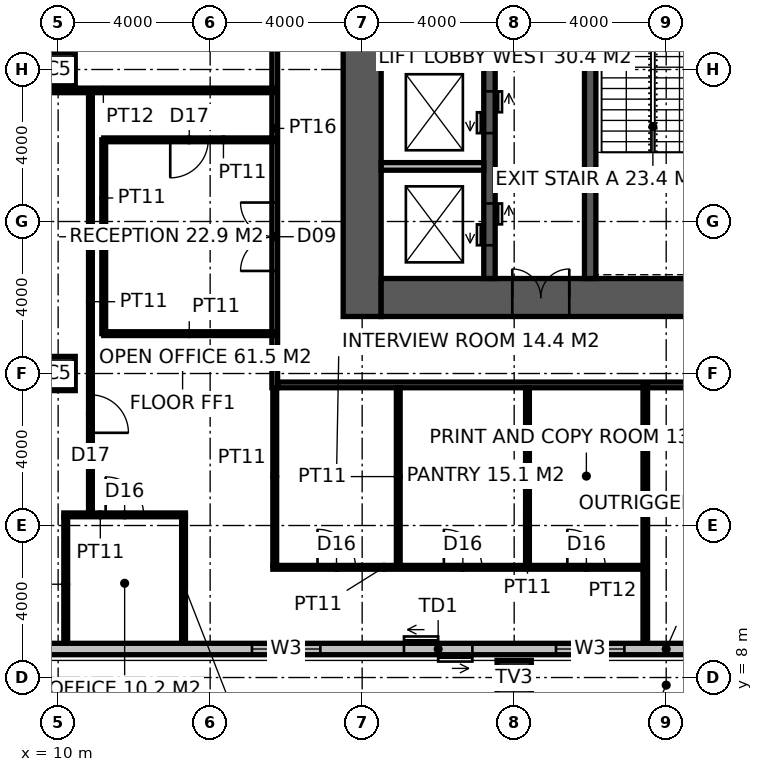
"""IFC4 building model, lengths in metres.
Left out: names, types, materials, properties, quantities, classifications, styles, units other than length and angle.
Written with IfcOpenShell. Run it as: python <this file> out.ifc"""

import sys

from ifc_helpers import new_model, si_unit, direction, frame, frame_2d, origin, origin_2d, place, context, subcontext, project, spatial, rectangle, hollow_rectangle, extrude, element, fill, save


model = new_model("IFC4")
c1 = context("Model", 3, precision=1e-05, world=origin(), true_north=direction((0.0, 1.0)))
c2 = subcontext(c1, "Body", "Model", "MODEL_VIEW")
j1 = project(units=[si_unit("LENGTHUNIT", "METRE"), si_unit("PLANEANGLEUNIT", "RADIAN")], contexts=[c1])
p1 = place(None, origin())
s1 = spatial("IfcSite", under=j1, at=p1, CompositionType="ELEMENT")
p2 = place(p1, origin())
s2 = spatial("IfcBuilding", under=s1, at=p2, CompositionType="ELEMENT")
p3 = place(p2, frame((0.0, 0.0, 171.8)))
s3 = spatial("IfcBuildingStorey", under=s2, at=p3, CompositionType="ELEMENT", Elevation=171.8)
p4 = place(p3, frame((22.0, 8.0, 0.0), z_axis=(0.0, 0.0, 1.0), x_axis=(1.0, 0.0, 0.0)))
e1 = element("IfcColumn", 1, at=p4, inside=s3, PredefinedType="USERDEFINED", context=c2, shape_type="SweptSolid", body=[
    extrude(hollow_rectangle(XDim=0.9, YDim=0.9, WallThickness=0.08, at=origin_2d()), origin(), (0.0, 0.0, 1.0), 4.0),
])
for number, where, z_axis, x_axis in (
    (2, (10.0, 16.0, 0.0), (0.0, 0.0, 1.0), (1.0, 0.0, 0.0)),
    (3, (10.0, 24.0, 0.0), (0.0, 0.0, 1.0), (1.0, 0.0, 0.0)),
):
    element("IfcColumn", number, at=place(p3, frame(where, z_axis=z_axis, x_axis=x_axis)), inside=s3, PredefinedType="COLUMN", context=c2, shape_type="SweptSolid", body=[
        extrude(hollow_rectangle(XDim=0.9, YDim=0.9, WallThickness=0.1, at=origin_2d()), origin(), (0.0, 0.0, 1.0), 4.0),
    ])
p5 = place(p3, frame((18.0, 17.5, -0.15), z_axis=(0.0, 0.0, 1.0), x_axis=(0.0, 1.0, 0.0)))
e4 = element("IfcWall", 4, at=p5, inside=s3, PredefinedType="SHEAR", context=c2, shape_type="SweptSolid", body=[
    extrude(rectangle(XDim=19.0, YDim=1.0, at=frame_2d((9.5, 0.0))), origin(), (0.0, 0.0, 1.0), 4.0),
])
p6 = place(p3, frame((18.5, 18.0, -0.15), z_axis=(0.0, 0.0, 1.0), x_axis=(1.0, 0.0, 0.0)))
e5 = element("IfcWall", 5, at=p6, inside=s3, PredefinedType="SHEAR", context=c2, shape_type="SweptSolid", body=[
    extrude(rectangle(XDim=17.6, YDim=1.0, at=frame_2d((8.8, 0.0))), origin(), (0.0, 0.0, 1.0), 4.0),
])
p7 = place(p6, frame((3.45, 0.0, 0.15)))
e6 = element("IfcOpeningElement", 6, at=p7, cuts=e5, PredefinedType="OPENING", context=c2, shape_type="SweptSolid", body=[
    extrude(rectangle(XDim=1.5, YDim=2.4, at=frame_2d((0.75, 1.2))), frame((0.0, 0.51, 0.0), z_axis=(0.0, -1.0, 0.0), x_axis=(1.0, 0.0, 0.0)), (0.0, 0.0, 1.0), 1.02),
])
p8 = place(p3, frame((24.0, 18.5, -0.15), z_axis=(0.0, 0.0, 1.0), x_axis=(0.0, 1.0, 0.0)))
e7 = element("IfcWall", 7, at=p8, inside=s3, PredefinedType="SHEAR", context=c2, shape_type="SweptSolid", body=[
    extrude(rectangle(XDim=17.0, YDim=0.3, at=frame_2d((8.5, 0.0))), origin(), (0.0, 0.0, 1.0), 4.0),
])
p9 = place(p8, frame((9.6, 0.0, 0.15)))
e8 = element("IfcOpeningElement", 8, at=p9, cuts=e7, PredefinedType="OPENING", context=c2, shape_type="SweptSolid", body=[
    extrude(rectangle(XDim=1.5, YDim=2.4, at=frame_2d((0.75, 1.2))), frame((0.0, 0.16, 0.0), z_axis=(0.0, -1.0, 0.0), x_axis=(1.0, 0.0, 0.0)), (0.0, 0.0, 1.0), 0.32),
])
p10 = place(p3, frame((21.35, 18.5, -0.15), z_axis=(0.0, 0.0, 1.0), x_axis=(0.0, 1.0, 0.0)))
e9 = element("IfcWall", 9, at=p10, inside=s3, PredefinedType="SHEAR", context=c2, shape_type="SweptSolid", body=[
    extrude(rectangle(XDim=12.5, YDim=0.3, at=frame_2d((6.25, 0.0))), origin(), (0.0, 0.0, 1.0), 4.0),
])
p11 = place(p10, frame((0.875, 0.0, 0.15)))
e10 = element("IfcOpeningElement", 10, at=p11, cuts=e9, PredefinedType="OPENING", context=c2, shape_type="SweptSolid", body=[
    extrude(rectangle(XDim=1.1, YDim=2.2, at=frame_2d((0.55, 1.1))), frame((0.0, 0.16, 0.0), z_axis=(0.0, -1.0, 0.0), x_axis=(1.0, 0.0, 0.0)), (0.0, 0.0, 1.0), 0.32),
])
p12 = place(p10, frame((3.825, 0.0, 0.15)))
e11 = element("IfcOpeningElement", 11, at=p12, cuts=e9, PredefinedType="OPENING", context=c2, shape_type="SweptSolid", body=[
    extrude(rectangle(XDim=1.1, YDim=2.2, at=frame_2d((0.55, 1.1))), frame((0.0, 0.16, 0.0), z_axis=(0.0, -1.0, 0.0), x_axis=(1.0, 0.0, 0.0)), (0.0, 0.0, 1.0), 0.32),
])
p13 = place(p10, frame((6.675, 0.0, 0.15)))
e12 = element("IfcOpeningElement", 12, at=p13, cuts=e9, PredefinedType="OPENING", context=c2, shape_type="SweptSolid", body=[
    extrude(rectangle(XDim=1.1, YDim=2.2, at=frame_2d((0.55, 1.1))), frame((0.0, 0.16, 0.0), z_axis=(0.0, -1.0, 0.0), x_axis=(1.0, 0.0, 0.0)), (0.0, 0.0, 1.0), 0.32),
])
p14 = place(p10, frame((9.575, 0.0, 0.15)))
e13 = element("IfcOpeningElement", 13, at=p14, cuts=e9, PredefinedType="OPENING", context=c2, shape_type="SweptSolid", body=[
    extrude(rectangle(XDim=1.1, YDim=2.2, at=frame_2d((0.55, 1.1))), frame((0.0, 0.16, 0.0), z_axis=(0.0, -1.0, 0.0), x_axis=(1.0, 0.0, 0.0)), (0.0, 0.0, 1.0), 0.32),
])
for number, where, z_axis, x_axis in (
    (14, (18.5, 21.45, -0.15), (0.0, 0.0, 1.0), (1.0, 0.0, 0.0)),
    (15, (18.5, 24.3, -0.15), (0.0, 0.0, 1.0), (1.0, 0.0, 0.0)),
):
    element("IfcWall", number, at=place(p3, frame(where, z_axis=z_axis, x_axis=x_axis)), inside=s3, PredefinedType="SOLIDWALL", context=c2, shape_type="SweptSolid", body=[
        extrude(rectangle(XDim=2.7, YDim=0.2, at=frame_2d((1.35, 0.0))), origin(), (0.0, 0.0, 1.0), 4.0),
    ])
p15 = place(p3, frame((15.7, 15.625, 0.0), z_axis=(0.0, 0.0, 1.0), x_axis=(0.0, 1.0, 0.0)))
e16 = element("IfcWall", 16, at=p15, inside=s3, PredefinedType="PARTITIONING", context=c2, shape_type="SweptSolid", body=[
    extrude(rectangle(XDim=22.75, YDim=0.15, at=frame_2d((11.375, 0.0))), origin(), (0.0, 0.0, 1.0), 3.85),
])
p16 = place(p15, frame((3.074, 0.0, 0.0)))
e17 = element("IfcOpeningElement", 17, at=p16, cuts=e16, PredefinedType="OPENING", context=c2, shape_type="SweptSolid", body=[
    extrude(rectangle(XDim=1.8, YDim=2.4, at=frame_2d((0.9, 1.2))), frame((0.0, 0.085, 0.0), z_axis=(0.0, -1.0, 0.0), x_axis=(1.0, 0.0, 0.0)), (0.0, 0.0, 1.0), 0.17),
])
p17 = place(p15, frame((16.876, 0.0, 0.0)))
e18 = element("IfcOpeningElement", 18, at=p17, cuts=e16, PredefinedType="OPENING", context=c2, shape_type="SweptSolid", body=[
    extrude(rectangle(XDim=1.8, YDim=2.4, at=frame_2d((0.9, 1.2))), frame((0.0, 0.085, 0.0), z_axis=(0.0, -1.0, 0.0), x_axis=(1.0, 0.0, 0.0)), (0.0, 0.0, 1.0), 0.17),
])
p18 = place(p15, frame((9.875, 0.0, 0.0)))
e19 = element("IfcOpeningElement", 19, at=p18, cuts=e16, PredefinedType="OPENING", context=c2, shape_type="SweptSolid", body=[
    extrude(rectangle(XDim=1.0, YDim=2.2, at=frame_2d((0.5, 1.1))), frame((0.0, 0.085, 0.0), z_axis=(0.0, -1.0, 0.0), x_axis=(1.0, 0.0, 0.0)), (0.0, 0.0, 1.0), 0.17),
])
p19 = place(p3, frame((15.775, 15.7, 0.0), z_axis=(0.0, 0.0, 1.0), x_axis=(1.0, 0.0, 0.0)))
e20 = element("IfcWall", 20, at=p19, inside=s3, PredefinedType="PARTITIONING", context=c2, shape_type="SweptSolid", body=[
    extrude(rectangle(XDim=22.05, YDim=0.15, at=frame_2d((11.025, 0.0))), origin(), (0.0, 0.0, 1.0), 3.85),
])
p20 = place(p19, frame((11.725, 0.0, 0.0)))
e21 = element("IfcOpeningElement", 21, at=p20, cuts=e20, PredefinedType="OPENING", context=c2, shape_type="SweptSolid", body=[
    extrude(rectangle(XDim=1.0, YDim=2.2, at=frame_2d((0.5, 1.1))), frame((0.0, 0.085, 0.0), z_axis=(0.0, -1.0, 0.0), x_axis=(1.0, 0.0, 0.0)), (0.0, 0.0, 1.0), 0.17),
])
p21 = place(p3, frame((25.45, 8.68, 0.0), z_axis=(0.0, 0.0, 1.0), x_axis=(0.0, 1.0, 0.0)))
e22 = element("IfcWall", 22, at=p21, inside=s3, PredefinedType="PARTITIONING", context=c2, shape_type="SweptSolid", body=[
    extrude(rectangle(XDim=7.02, YDim=0.12, at=frame_2d((3.51, 0.0))), origin(), (0.0, 0.0, 1.0), 2.65),
])
p22 = place(p3, frame((6.68, 23.45, 0.0), z_axis=(0.0, 0.0, 1.0), x_axis=(1.0, 0.0, 0.0)))
e23 = element("IfcWall", 23, at=p22, inside=s3, PredefinedType="PARTITIONING", context=c2, shape_type="SweptSolid", body=[
    extrude(rectangle(XDim=9.02, YDim=0.12, at=frame_2d((4.51, 0.0))), origin(), (0.0, 0.0, 1.0), 2.65),
])
p23 = place(p3, frame((15.65, 10.9, 0.0), z_axis=(0.0, 0.0, 1.0), x_axis=(1.0, 0.0, 0.0)))
e24 = element("IfcWall", 24, at=p23, inside=s3, PredefinedType="PARTITIONING", context=c2, shape_type="SweptSolid", body=[
    extrude(rectangle(XDim=9.739, YDim=0.1, at=frame_2d((4.87, 0.0))), origin(), (0.0, 0.0, 1.0), 3.85),
])
p24 = place(p23, frame((1.175, 0.0, 0.0)))
e25 = element("IfcOpeningElement", 25, at=p24, cuts=e24, PredefinedType="OPENING", context=c2, shape_type="SweptSolid", body=[
    extrude(rectangle(XDim=1.0, YDim=2.2, at=frame_2d((0.5, 1.1))), frame((0.0, 0.06, 0.0), z_axis=(0.0, -1.0, 0.0), x_axis=(1.0, 0.0, 0.0)), (0.0, 0.0, 1.0), 0.12),
])
p25 = place(p23, frame((4.5, 0.0, 0.0)))
e26 = element("IfcOpeningElement", 26, at=p25, cuts=e24, PredefinedType="OPENING", context=c2, shape_type="SweptSolid", body=[
    extrude(rectangle(XDim=1.0, YDim=2.2, at=frame_2d((0.5, 1.1))), frame((0.0, 0.06, 0.0), z_axis=(0.0, -1.0, 0.0), x_axis=(1.0, 0.0, 0.0)), (0.0, 0.0, 1.0), 0.12),
])
p26 = place(p23, frame((7.75, 0.0, 0.0)))
e27 = element("IfcOpeningElement", 27, at=p26, cuts=e24, PredefinedType="OPENING", context=c2, shape_type="SweptSolid", body=[
    extrude(rectangle(XDim=1.0, YDim=2.2, at=frame_2d((0.5, 1.1))), frame((0.0, 0.06, 0.0), z_axis=(0.0, -1.0, 0.0), x_axis=(1.0, 0.0, 0.0)), (0.0, 0.0, 1.0), 0.12),
])
p27 = place(p3, frame((10.15, 12.28, 0.0), z_axis=(0.0, 0.0, 1.0), x_axis=(1.0, 0.0, 0.0)))
e28 = element("IfcWall", 28, at=p27, inside=s3, PredefinedType="PARTITIONING", context=c2, shape_type="SweptSolid", body=[
    extrude(rectangle(XDim=3.2, YDim=0.1, at=frame_2d((1.6, 0.0))), origin(), (0.0, 0.0, 1.0), 3.85),
])
p28 = place(p27, frame((1.1, 0.0, 0.0)))
e29 = element("IfcOpeningElement", 29, at=p28, cuts=e28, PredefinedType="OPENING", context=c2, shape_type="SweptSolid", body=[
    extrude(rectangle(XDim=1.0, YDim=2.2, at=frame_2d((0.5, 1.1))), frame((0.0, 0.06, 0.0), z_axis=(0.0, -1.0, 0.0), x_axis=(1.0, 0.0, 0.0)), (0.0, 0.0, 1.0), 0.12),
])
p29 = place(p3, frame((10.2, 8.68, 0.0), z_axis=(0.0, 0.0, 1.0), x_axis=(0.0, 1.0, 0.0)))
e30 = element("IfcWall", 30, at=p29, inside=s3, PredefinedType="PARTITIONING", context=c2, shape_type="SweptSolid", body=[
    extrude(rectangle(XDim=3.55, YDim=0.1, at=frame_2d((1.775, 0.0))), origin(), (0.0, 0.0, 1.0), 2.65),
])
p30 = place(p3, frame((13.3, 8.68, 0.0), z_axis=(0.0, 0.0, 1.0), x_axis=(0.0, 1.0, 0.0)))
e31 = element("IfcWall", 31, at=p30, inside=s3, PredefinedType="PARTITIONING", context=c2, shape_type="SweptSolid", body=[
    extrude(rectangle(XDim=3.55, YDim=0.1, at=frame_2d((1.775, 0.0))), origin(), (0.0, 0.0, 1.0), 3.85),
])
for number, where, z_axis, x_axis in (
    (32, (15.7, 10.95, 0.0), (0.0, 0.0, 1.0), (0.0, 1.0, 0.0)),
    (33, (18.95, 10.95, 0.0), (0.0, 0.0, 1.0), (0.0, 1.0, 0.0)),
):
    element("IfcWall", number, at=place(p3, frame(where, z_axis=z_axis, x_axis=x_axis)), inside=s3, PredefinedType="PARTITIONING", context=c2, shape_type="SweptSolid", body=[
        extrude(rectangle(XDim=4.675, YDim=0.1, at=frame_2d((2.337, 0.0))), origin(), (0.0, 0.0, 1.0), 3.85),
    ])
p31 = place(p3, frame((22.35, 10.95, 0.0), z_axis=(0.0, 0.0, 1.0), x_axis=(0.0, 1.0, 0.0)))
e34 = element("IfcWall", 34, at=p31, inside=s3, PredefinedType="PARTITIONING", context=c2, shape_type="SweptSolid", body=[
    extrude(rectangle(XDim=4.675, YDim=0.1, at=frame_2d((2.337, 0.0))), origin(), (0.0, 0.0, 1.0), 2.65),
])
p32 = place(p3, frame((10.85, 23.449, 0.0), z_axis=(0.0, 0.0, 1.0), x_axis=(0.0, -1.0, 0.0)))
e35 = element("IfcWall", 35, at=p32, inside=s3, PredefinedType="PARTITIONING", context=c2, shape_type="SweptSolid", body=[
    extrude(rectangle(XDim=11.119, YDim=0.1, at=frame_2d((5.56, 0.0))), origin(), (0.0, 0.0, 1.0), 3.85),
])
p33 = place(p32, frame((8.01, 0.0, 0.0)))
e36 = element("IfcOpeningElement", 36, at=p33, cuts=e35, PredefinedType="OPENING", context=c2, shape_type="SweptSolid", body=[
    extrude(rectangle(XDim=1.0, YDim=2.2, at=frame_2d((0.5, 1.1))), frame((0.0, 0.06, 0.0), z_axis=(0.0, -1.0, 0.0), x_axis=(1.0, 0.0, 0.0)), (0.0, 0.0, 1.0), 0.12),
])
p34 = place(p3, frame((15.7, 22.149, 0.0), z_axis=(0.0, 0.0, 1.0), x_axis=(-1.0, 0.0, 0.0)))
e37 = element("IfcWall", 37, at=p34, inside=s3, PredefinedType="PARTITIONING", context=c2, shape_type="SweptSolid", body=[
    extrude(rectangle(XDim=4.5, YDim=0.1, at=frame_2d((2.25, 0.0))), origin(), (0.0, 0.0, 1.0), 3.85),
])
p35 = place(p34, frame((1.75, 0.0, 0.0)))
e38 = element("IfcOpeningElement", 38, at=p35, cuts=e37, PredefinedType="OPENING", context=c2, shape_type="SweptSolid", body=[
    extrude(rectangle(XDim=1.0, YDim=2.2, at=frame_2d((0.5, 1.1))), frame((0.0, 0.06, 0.0), z_axis=(0.0, -1.0, 0.0), x_axis=(1.0, 0.0, 0.0)), (0.0, 0.0, 1.0), 0.12),
])
p36 = place(p3, frame((11.2, 22.149, 0.0), z_axis=(0.0, 0.0, 1.0), x_axis=(0.0, -1.0, 0.0)))
e39 = element("IfcWall", 39, at=p36, inside=s3, PredefinedType="PARTITIONING", context=c2, shape_type="SweptSolid", body=[
    extrude(rectangle(XDim=5.1, YDim=0.1, at=frame_2d((2.55, 0.0))), origin(), (0.0, 0.0, 1.0), 3.85),
])
p37 = place(p3, frame((11.2, 17.049, 0.0), z_axis=(0.0, 0.0, 1.0), x_axis=(1.0, 0.0, 0.0)))
e40 = element("IfcWall", 40, at=p37, inside=s3, PredefinedType="PARTITIONING", context=c2, shape_type="SweptSolid", body=[
    extrude(rectangle(XDim=4.5, YDim=0.1, at=frame_2d((2.25, 0.0))), origin(), (0.0, 0.0, 1.0), 3.85),
])
p38 = place(p3, frame((9.6, 8.75, 0.0), z_axis=(0.0, 0.0, 1.0), x_axis=(1.0, 0.0, 0.0)))
e41 = element("IfcWall", 41, at=p38, inside=s3, PredefinedType="ELEMENTEDWALL", context=c2, shape_type="SweptSolid", body=[
    extrude(rectangle(XDim=32.8, YDim=0.3, at=frame_2d((16.4, 0.0))), origin(), (0.0, 0.0, 1.0), 3.85),
])
p39 = place(p38, frame((5.5, 0.0, 0.8)))
e42 = element("IfcOpeningElement", 42, at=p39, cuts=e41, PredefinedType="OPENING", context=c2, shape_type="SweptSolid", body=[
    extrude(rectangle(XDim=1.8, YDim=2.4, at=frame_2d((0.9, 1.2))), frame((0.0, 0.16, 0.0), z_axis=(0.0, -1.0, 0.0), x_axis=(1.0, 0.0, 0.0)), (0.0, 0.0, 1.0), 0.32),
])
p40 = place(p38, frame((9.5, 0.0, 0.0)))
e43 = element("IfcOpeningElement", 43, at=p40, cuts=e41, PredefinedType="OPENING", context=c2, shape_type="SweptSolid", body=[
    extrude(rectangle(XDim=1.8, YDim=2.4, at=frame_2d((0.9, 1.2))), frame((0.0, 0.16, 0.0), z_axis=(0.0, -1.0, 0.0), x_axis=(1.0, 0.0, 0.0)), (0.0, 0.0, 1.0), 0.32),
])
p41 = place(p38, frame((13.5, 0.0, 0.8)))
e44 = element("IfcOpeningElement", 44, at=p41, cuts=e41, PredefinedType="OPENING", context=c2, shape_type="SweptSolid", body=[
    extrude(rectangle(XDim=1.8, YDim=2.4, at=frame_2d((0.9, 1.2))), frame((0.0, 0.16, 0.0), z_axis=(0.0, -1.0, 0.0), x_axis=(1.0, 0.0, 0.0)), (0.0, 0.0, 1.0), 0.32),
])
p42 = place(p38, frame((17.2, 0.0, 0.8)))
e45 = element("IfcOpeningElement", 45, at=p42, cuts=e41, PredefinedType="OPENING", context=c2, shape_type="SweptSolid", body=[
    extrude(rectangle(XDim=1.0, YDim=2.4, at=frame_2d((0.5, 1.2))), frame((0.0, 0.16, 0.0), z_axis=(0.0, -1.0, 0.0), x_axis=(1.0, 0.0, 0.0)), (0.0, 0.0, 1.0), 0.32),
])
p43 = place(p38, frame((18.6, 0.0, 0.8)))
e46 = element("IfcOpeningElement", 46, at=p43, cuts=e41, PredefinedType="OPENING", context=c2, shape_type="SweptSolid", body=[
    extrude(rectangle(XDim=1.0, YDim=2.4, at=frame_2d((0.5, 1.2))), frame((0.0, 0.16, 0.0), z_axis=(0.0, -1.0, 0.0), x_axis=(1.0, 0.0, 0.0)), (0.0, 0.0, 1.0), 0.32),
])
p44 = place(p38, frame((21.5, 0.0, 0.0)))
e47 = element("IfcOpeningElement", 47, at=p44, cuts=e41, PredefinedType="OPENING", context=c2, shape_type="SweptSolid", body=[
    extrude(rectangle(XDim=1.8, YDim=2.4, at=frame_2d((0.9, 1.2))), frame((0.0, 0.16, 0.0), z_axis=(0.0, -1.0, 0.0), x_axis=(1.0, 0.0, 0.0)), (0.0, 0.0, 1.0), 0.32),
])
p45 = place(p38, frame((25.5, 0.0, 0.8)))
e48 = element("IfcOpeningElement", 48, at=p45, cuts=e41, PredefinedType="OPENING", context=c2, shape_type="SweptSolid", body=[
    extrude(rectangle(XDim=1.8, YDim=2.4, at=frame_2d((0.9, 1.2))), frame((0.0, 0.16, 0.0), z_axis=(0.0, -1.0, 0.0), x_axis=(1.0, 0.0, 0.0)), (0.0, 0.0, 1.0), 0.32),
])
p46 = place(p7, origin())
e49 = element("IfcDoor", 49, at=p46, inside=s3, OperationType="DOUBLE_DOOR_DOUBLE_SWING", PredefinedType="DOOR", context=c2, shape_type="SweptSolid", body=[
    extrude(rectangle(XDim=1.5, YDim=2.4, at=frame_2d((0.75, 1.2))), frame((0.0, 0.025, 0.0), z_axis=(0.0, -1.0, 0.0), x_axis=(1.0, 0.0, 0.0)), (0.0, 0.0, 1.0), 0.05),
])
fill(e6, e49)
p47 = place(p16, origin())
e50 = element("IfcDoor", 50, at=p47, inside=s3, OperationType="DOUBLE_DOOR_DOUBLE_SWING", PredefinedType="DOOR", context=c2, shape_type="SweptSolid", body=[
    extrude(rectangle(XDim=1.8, YDim=2.4, at=frame_2d((0.9, 1.2))), frame((0.0, 0.025, 0.0), z_axis=(0.0, -1.0, 0.0), x_axis=(1.0, 0.0, 0.0)), (0.0, 0.0, 1.0), 0.05),
])
fill(e17, e50)
p48 = place(p24, origin())
e51 = element("IfcDoor", 51, at=p48, inside=s3, OperationType="SINGLE_SWING_LEFT", PredefinedType="DOOR", context=c2, shape_type="SweptSolid", body=[
    extrude(rectangle(XDim=1.0, YDim=2.2, at=frame_2d((0.5, 1.1))), frame((0.0, 0.025, 0.0), z_axis=(0.0, -1.0, 0.0), x_axis=(1.0, 0.0, 0.0)), (0.0, 0.0, 1.0), 0.05),
])
fill(e25, e51)
p49 = place(p25, origin())
e52 = element("IfcDoor", 52, at=p49, inside=s3, OperationType="SINGLE_SWING_LEFT", PredefinedType="DOOR", context=c2, shape_type="SweptSolid", body=[
    extrude(rectangle(XDim=1.0, YDim=2.2, at=frame_2d((0.5, 1.1))), frame((0.0, 0.025, 0.0), z_axis=(0.0, -1.0, 0.0), x_axis=(1.0, 0.0, 0.0)), (0.0, 0.0, 1.0), 0.05),
])
fill(e26, e52)
p50 = place(p26, origin())
e53 = element("IfcDoor", 53, at=p50, inside=s3, OperationType="SINGLE_SWING_LEFT", PredefinedType="DOOR", context=c2, shape_type="SweptSolid", body=[
    extrude(rectangle(XDim=1.0, YDim=2.2, at=frame_2d((0.5, 1.1))), frame((0.0, 0.025, 0.0), z_axis=(0.0, -1.0, 0.0), x_axis=(1.0, 0.0, 0.0)), (0.0, 0.0, 1.0), 0.05),
])
fill(e27, e53)
p51 = place(p28, origin())
e54 = element("IfcDoor", 54, at=p51, inside=s3, OperationType="SINGLE_SWING_LEFT", PredefinedType="DOOR", context=c2, shape_type="SweptSolid", body=[
    extrude(rectangle(XDim=1.0, YDim=2.2, at=frame_2d((0.5, 1.1))), frame((0.0, 0.025, 0.0), z_axis=(0.0, -1.0, 0.0), x_axis=(1.0, 0.0, 0.0)), (0.0, 0.0, 1.0), 0.05),
])
fill(e29, e54)
p52 = place(p33, origin())
e55 = element("IfcDoor", 55, at=p52, inside=s3, OperationType="SINGLE_SWING_RIGHT", PredefinedType="DOOR", context=c2, shape_type="SweptSolid", body=[
    extrude(rectangle(XDim=1.0, YDim=2.2, at=frame_2d((0.5, 1.1))), frame((0.0, 0.025, 0.0), z_axis=(0.0, -1.0, 0.0), x_axis=(1.0, 0.0, 0.0)), (0.0, 0.0, 1.0), 0.05),
])
fill(e36, e55)
p53 = place(p35, origin())
e56 = element("IfcDoor", 56, at=p53, inside=s3, OperationType="SINGLE_SWING_RIGHT", PredefinedType="DOOR", context=c2, shape_type="SweptSolid", body=[
    extrude(rectangle(XDim=1.0, YDim=2.2, at=frame_2d((0.5, 1.1))), frame((0.0, 0.025, 0.0), z_axis=(0.0, -1.0, 0.0), x_axis=(1.0, 0.0, 0.0)), (0.0, 0.0, 1.0), 0.05),
])
fill(e38, e56)
p54 = place(p11, origin())
e57 = element("IfcDoor", 57, at=p54, inside=s3, OperationType="DOUBLE_DOOR_SLIDING", PredefinedType="DOOR", context=c2, shape_type="SweptSolid", body=[
    extrude(rectangle(XDim=1.1, YDim=2.2, at=frame_2d((0.55, 1.1))), frame((0.0, 0.025, 0.0), z_axis=(0.0, -1.0, 0.0), x_axis=(1.0, 0.0, 0.0)), (0.0, 0.0, 1.0), 0.05),
])
fill(e10, e57)
p55 = place(p12, origin())
e58 = element("IfcDoor", 58, at=p55, inside=s3, OperationType="DOUBLE_DOOR_SLIDING", PredefinedType="DOOR", context=c2, shape_type="SweptSolid", body=[
    extrude(rectangle(XDim=1.1, YDim=2.2, at=frame_2d((0.55, 1.1))), frame((0.0, 0.025, 0.0), z_axis=(0.0, -1.0, 0.0), x_axis=(1.0, 0.0, 0.0)), (0.0, 0.0, 1.0), 0.05),
])
fill(e11, e58)
p56 = place(p39, origin())
e59 = element("IfcWindow", 59, at=p56, inside=s3, PartitioningType="SINGLE_PANEL", PredefinedType="WINDOW", context=c2, shape_type="SweptSolid", body=[
    extrude(rectangle(XDim=1.8, YDim=2.4, at=frame_2d((0.9, 1.2))), frame((0.0, 0.03, 0.0), z_axis=(0.0, -1.0, 0.0), x_axis=(1.0, 0.0, 0.0)), (0.0, 0.0, 1.0), 0.06),
])
fill(e42, e59)
p57 = place(p40, origin())
e60 = element("IfcDoor", 60, at=p57, inside=s3, OperationType="DOUBLE_DOOR_SLIDING", PredefinedType="DOOR", context=c2, shape_type="SweptSolid", body=[
    extrude(rectangle(XDim=1.8, YDim=2.4, at=frame_2d((0.9, 1.2))), frame((0.0, 0.025, 0.0), z_axis=(0.0, -1.0, 0.0), x_axis=(1.0, 0.0, 0.0)), (0.0, 0.0, 1.0), 0.05),
])
fill(e43, e60)
p58 = place(p41, origin())
e61 = element("IfcWindow", 61, at=p58, inside=s3, PartitioningType="SINGLE_PANEL", PredefinedType="WINDOW", context=c2, shape_type="SweptSolid", body=[
    extrude(rectangle(XDim=1.8, YDim=2.4, at=frame_2d((0.9, 1.2))), frame((0.0, 0.03, 0.0), z_axis=(0.0, -1.0, 0.0), x_axis=(1.0, 0.0, 0.0)), (0.0, 0.0, 1.0), 0.06),
])
fill(e44, e61)
save(model, sys.argv[1])
